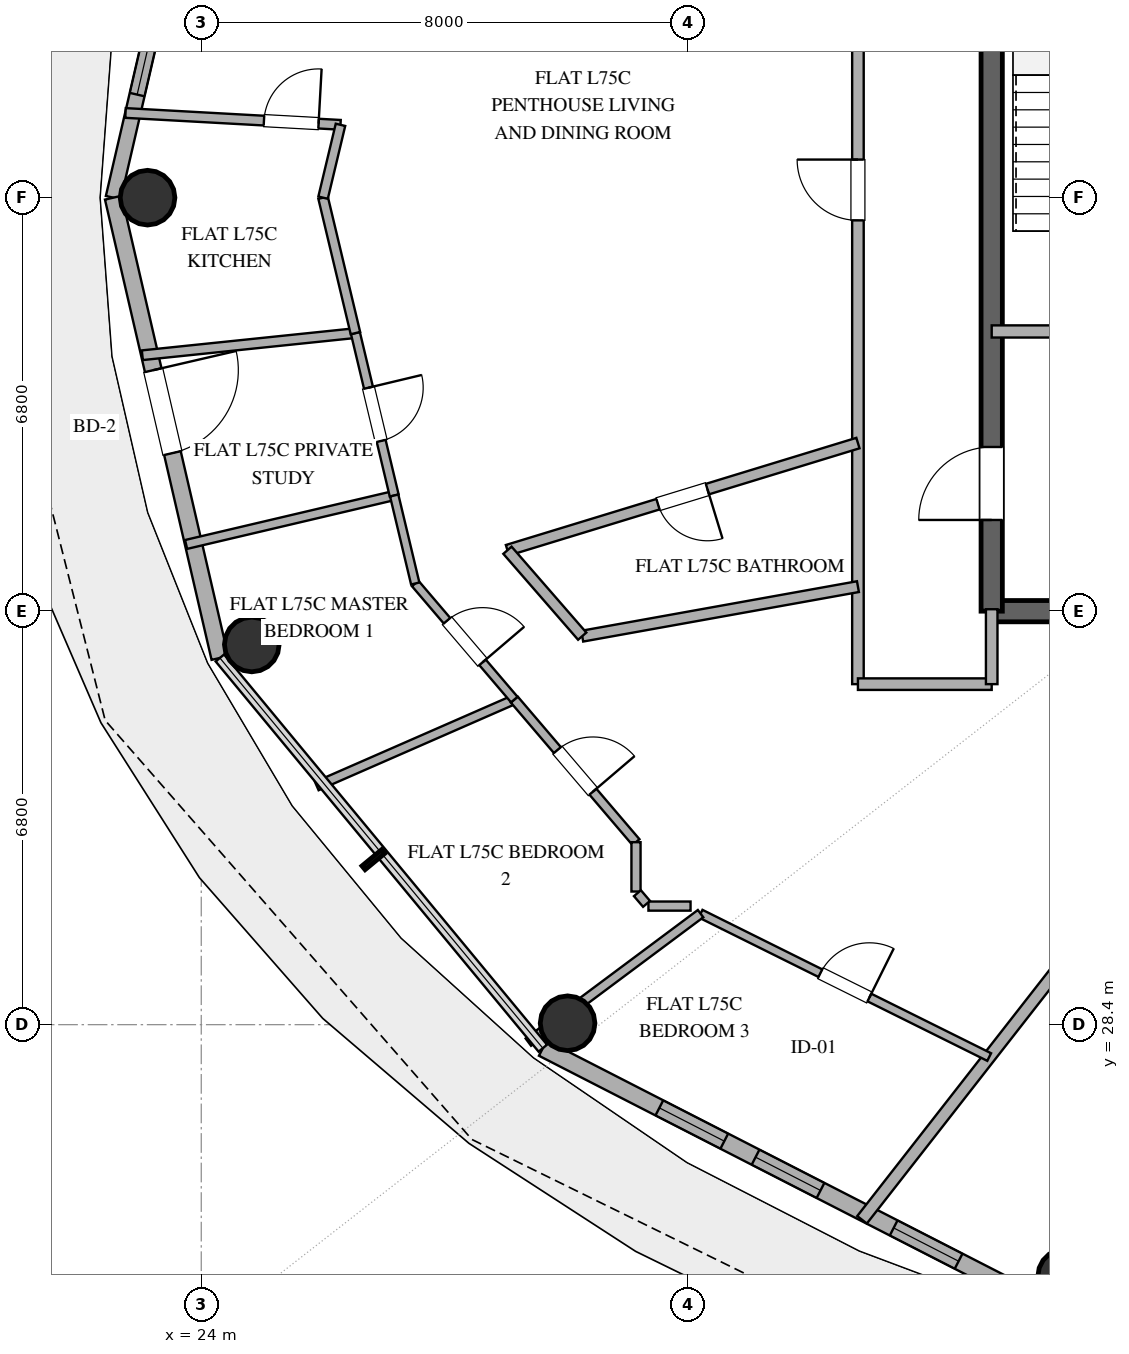
"""IFC4 building model, lengths in metres.
Left out: names, types, materials, properties, quantities, classifications, styles, units other than length and angle.
Written with IfcOpenShell. Run it as: python <this file> out.ifc"""

import sys

from ifc_helpers import new_model, si_unit, direction, frame, frame_2d, origin, origin_2d, place, context, subcontext, project, spatial, rectangle, hollow_circle, extrude, element, fill, save


model = new_model("IFC4")
c1 = context("Model", 3, precision=1e-05, world=origin(), true_north=direction((0.0, 1.0)))
c2 = subcontext(c1, "Body", "Model", "MODEL_VIEW")
j1 = project(units=[si_unit("LENGTHUNIT", "METRE"), si_unit("PLANEANGLEUNIT", "RADIAN")], contexts=[c1])
p1 = place(None, origin())
s1 = spatial("IfcSite", under=j1, at=p1, CompositionType="ELEMENT")
p2 = place(p1, origin())
s2 = spatial("IfcBuilding", under=s1, at=p2, CompositionType="ELEMENT")
p3 = place(p2, frame((0.0, 0.0, 291.0)))
s3 = spatial("IfcBuildingStorey", under=s2, at=p3, CompositionType="ELEMENT", Elevation=291.0)
p4 = place(p3, frame((37.0, 35.2, 0.0), z_axis=(0.0, 0.0, 1.0), x_axis=(1.0, 0.0, 0.0)))
e1 = element("IfcWall", 1, at=p4, inside=s3, PredefinedType="SHEAR", context=c2, shape_type="SweptSolid", body=[
    extrude(rectangle(XDim=4.0, YDim=0.35, at=frame_2d((2.0, 0.0))), origin(), (0.0, 0.0, 1.0), 3.37),
])
p5 = place(p3, frame((37.0, 35.2, 0.0), z_axis=(0.0, 0.0, 1.0), x_axis=(0.0, 1.0, 0.0)))
e2 = element("IfcWall", 2, at=p5, inside=s3, PredefinedType="SHEAR", context=c2, shape_type="SweptSolid", body=[
    extrude(rectangle(XDim=13.6, YDim=0.35, at=frame_2d((6.8, 0.0))), origin(), (0.0, 0.0, 1.0), 3.37),
])
p6 = place(p5, frame((1.5, 0.0, 0.0)))
e3 = element("IfcOpeningElement", 3, at=p6, cuts=e2, PredefinedType="OPENING", context=c2, shape_type="SweptSolid", body=[
    extrude(rectangle(XDim=1.2, YDim=2.15, at=frame_2d((0.6, 1.075))), frame((0.0, 0.185, 0.0), z_axis=(0.0, -1.0, 0.0), x_axis=(1.0, 0.0, 0.0)), (0.0, 0.0, 1.0), 0.37),
])
for number, where, z_axis, x_axis in (
    (4, (23.117, 42.0, 0.0), (0.0, 0.0, 1.0), (1.0, 0.0, 0.0)),
    (5, (24.831, 34.653, 0.0), (0.0, 0.0, 1.0), (1.0, 0.0, 0.0)),
    (6, (30.025, 28.424, 0.0), (0.0, 0.0, 1.0), (1.0, 0.0, 0.0)),
    (7, (38.209, 24.261, 0.0), (0.0, 0.0, 1.0), (1.0, 0.0, 0.0)),
):
    element("IfcColumn", number, at=place(p3, frame(where, z_axis=z_axis, x_axis=x_axis)), inside=s3, PredefinedType="COLUMN", context=c2, shape_type="SweptSolid", body=[
        extrude(hollow_circle(Radius=0.45, WallThickness=0.025, at=origin_2d()), origin(), (0.0, 0.0, 1.0), 3.37),
    ])
p7 = place(p3, frame((24.306, 49.57, 0.0), z_axis=(0.0, 0.0, 1.0), x_axis=(-0.225635078214, -0.974211892495, 0.0)))
e8 = element("IfcWall", 8, at=p7, inside=s3, PredefinedType="SOLIDWALL", context=c2, shape_type="SweptSolid", body=[
    extrude(rectangle(XDim=7.77, YDim=0.25, at=frame_2d((3.885, 0.0))), origin(), (0.0, 0.0, 1.0), 3.37),
])
p8 = place(p7, frame((5.03, 0.0, 1.42)))
e9 = element("IfcOpeningElement", 9, at=p8, cuts=e8, PredefinedType="OPENING", context=c2, shape_type="SweptSolid", body=[
    extrude(rectangle(XDim=1.0, YDim=1.05, at=frame_2d((0.5, 0.525))), frame((0.0, 0.135, 0.0), z_axis=(0.0, -1.0, 0.0), x_axis=(1.0, 0.0, 0.0)), (0.0, 0.0, 1.0), 0.27),
])
p9 = place(p3, frame((22.553, 42.0, 0.0), z_axis=(0.0, 0.0, 1.0), x_axis=(0.225635078214, -0.974211892495, 0.0)))
e10 = element("IfcWall", 10, at=p9, inside=s3, PredefinedType="SOLIDWALL", context=c2, shape_type="SweptSolid", body=[
    extrude(rectangle(XDim=7.77, YDim=0.28, at=frame_2d((3.885, 0.0))), origin(), (0.0, 0.0, 1.0), 3.37),
])
p10 = place(p9, frame((2.912, 0.0, 0.0)))
e11 = element("IfcOpeningElement", 11, at=p10, cuts=e10, PredefinedType="OPENING", context=c2, shape_type="SweptSolid", body=[
    extrude(rectangle(XDim=1.4, YDim=2.2, at=frame_2d((0.7, 1.1))), frame((0.0, 0.15, 0.0), z_axis=(0.0, -1.0, 0.0), x_axis=(1.0, 0.0, 0.0)), (0.0, 0.0, 1.0), 0.3),
])
p11 = place(p3, frame((29.617, 28.013, 0.0), z_axis=(0.0, 0.0, 1.0), x_axis=(0.890007394051, -0.455946091699, 0.0)))
e12 = element("IfcWall", 12, at=p11, inside=s3, PredefinedType="SOLIDWALL", context=c2, shape_type="SweptSolid", body=[
    extrude(rectangle(XDim=9.404, YDim=0.28, at=frame_2d((4.702, 0.0))), origin(), (0.0, 0.0, 1.0), 3.37),
])
p12 = place(p11, frame((2.154, 0.0, 0.85)))
e13 = element("IfcOpeningElement", 13, at=p12, cuts=e12, PredefinedType="OPENING", context=c2, shape_type="SweptSolid", body=[
    extrude(rectangle(XDim=1.2, YDim=1.8, at=frame_2d((0.6, 0.9))), frame((0.0, 0.15, 0.0), z_axis=(0.0, -1.0, 0.0), x_axis=(1.0, 0.0, 0.0)), (0.0, 0.0, 1.0), 0.3),
])
p13 = place(p11, frame((3.931, 0.0, 0.85)))
e14 = element("IfcOpeningElement", 14, at=p13, cuts=e12, PredefinedType="OPENING", context=c2, shape_type="SweptSolid", body=[
    extrude(rectangle(XDim=1.2, YDim=1.8, at=frame_2d((0.6, 0.9))), frame((0.0, 0.15, 0.0), z_axis=(0.0, -1.0, 0.0), x_axis=(1.0, 0.0, 0.0)), (0.0, 0.0, 1.0), 0.3),
])
p14 = place(p11, frame((6.483, 0.0, 0.85)))
e15 = element("IfcOpeningElement", 15, at=p14, cuts=e12, PredefinedType="OPENING", context=c2, shape_type="SweptSolid", body=[
    extrude(rectangle(XDim=1.2, YDim=1.6, at=frame_2d((0.6, 0.8))), frame((0.0, 0.15, 0.0), z_axis=(0.0, -1.0, 0.0), x_axis=(1.0, 0.0, 0.0)), (0.0, 0.0, 1.0), 0.3),
])
p15 = place(p3, frame((37.0, 39.8, 0.0), z_axis=(0.0, 0.0, 1.0), x_axis=(1.0, 0.0, 0.0)))
e16 = element("IfcWall", 16, at=p15, inside=s3, PredefinedType="SOLIDWALL", context=c2, shape_type="SweptSolid", body=[
    extrude(rectangle(XDim=4.0, YDim=0.2, at=frame_2d((2.0, 0.0))), origin(), (0.0, 0.0, 1.0), 2.73),
])
p16 = place(p15, frame((1.45, 0.0, 0.0)))
e17 = element("IfcOpeningElement", 17, at=p16, cuts=e16, PredefinedType="OPENING", context=c2, shape_type="SweptSolid", body=[
    extrude(rectangle(XDim=1.1, YDim=2.15, at=frame_2d((0.55, 1.075))), frame((0.0, 0.11, 0.0), z_axis=(0.0, -1.0, 0.0), x_axis=(1.0, 0.0, 0.0)), (0.0, 0.0, 1.0), 0.22),
])
p17 = place(p3, frame((42.687, 35.2, 0.0), z_axis=(0.0, 0.0, 1.0), x_axis=(-0.615663811723, -0.788008928208, 0.0)))
e18 = element("IfcWall", 18, at=p17, inside=s3, PredefinedType="PARTITIONING", context=c2, shape_type="SweptSolid", body=[
    extrude(rectangle(XDim=12.701, YDim=0.2, at=frame_2d((6.351, 0.0))), origin(), (0.0, 0.0, 1.0), 2.73),
])
p18 = place(p3, frame((34.8, 34.0, 0.0), z_axis=(0.0, 0.0, 1.0), x_axis=(0.0, 1.0, 0.0)))
e19 = element("IfcWall", 19, at=p18, inside=s3, PredefinedType="PARTITIONING", context=c2, shape_type="SweptSolid", body=[
    extrude(rectangle(XDim=16.9, YDim=0.19, at=frame_2d((8.45, 0.0))), origin(), (0.0, 0.0, 1.0), 2.73),
])
p19 = place(p18, frame((7.627, 0.0, 0.0)))
e20 = element("IfcOpeningElement", 20, at=p19, cuts=e19, PredefinedType="OPENING", context=c2, shape_type="SweptSolid", body=[
    extrude(rectangle(XDim=1.0, YDim=2.2, at=frame_2d((0.5, 1.1))), frame((0.0, 0.105, 0.0), z_axis=(0.0, -1.0, 0.0), x_axis=(1.0, 0.0, 0.0)), (0.0, 0.0, 1.0), 0.21),
])
p20 = place(p3, frame((34.8, 37.964, 0.0), z_axis=(0.0, 0.0, 1.0), x_axis=(-0.956308169094, -0.292360540641, 0.0)))
e21 = element("IfcWall", 21, at=p20, inside=s3, PredefinedType="PLUMBINGWALL", context=c2, shape_type="SweptSolid", body=[
    extrude(rectangle(XDim=6.028, YDim=0.18, at=frame_2d((3.014, 0.0))), origin(), (0.0, 0.0, 1.0), 2.73),
])
p21 = place(p20, frame((2.589, 0.0, 0.0)))
e22 = element("IfcOpeningElement", 22, at=p21, cuts=e21, PredefinedType="OPENING", context=c2, shape_type="SweptSolid", body=[
    extrude(rectangle(XDim=0.85, YDim=2.1, at=frame_2d((0.425, 1.05))), frame((0.0, 0.1, 0.0), z_axis=(0.0, -1.0, 0.0), x_axis=(1.0, 0.0, 0.0)), (0.0, 0.0, 1.0), 0.2),
])
p22 = place(p3, frame((32.212, 30.226, 0.0), z_axis=(0.0, 0.0, 1.0), x_axis=(0.895575883974, -0.444908795197, 0.0)))
e23 = element("IfcWall", 23, at=p22, inside=s3, PredefinedType="PARTITIONING", context=c2, shape_type="SweptSolid", body=[
    extrude(rectangle(XDim=5.3, YDim=0.14, at=frame_2d((2.65, 0.0))), origin(), (0.0, 0.0, 1.0), 2.73),
])
p23 = place(p22, frame((2.2, 0.0, 0.0)))
e24 = element("IfcOpeningElement", 24, at=p23, cuts=e23, PredefinedType="OPENING", context=c2, shape_type="SweptSolid", body=[
    extrude(rectangle(XDim=0.9, YDim=2.1, at=frame_2d((0.45, 1.05))), frame((0.0, 0.08, 0.0), z_axis=(0.0, -1.0, 0.0), x_axis=(1.0, 0.0, 0.0)), (0.0, 0.0, 1.0), 0.16),
])
p24 = place(p3, frame((30.265, 34.789, 0.0), z_axis=(0.0, 0.0, 1.0), x_axis=(0.984250881723, 0.176777266148, 0.0)))
e25 = element("IfcWall", 25, at=p24, inside=s3, PredefinedType="PLUMBINGWALL", context=c2, shape_type="SweptSolid", body=[
    extrude(rectangle(XDim=4.607, YDim=0.18, at=frame_2d((2.304, 0.0))), origin(), (0.0, 0.0, 1.0), 2.73),
])
p25 = place(p3, frame((29.148, 33.746, 0.0), z_axis=(0.0, 0.0, 1.0), x_axis=(-0.916054593567, -0.401053589442, 0.0)))
e26 = element("IfcWall", 26, at=p25, inside=s3, PredefinedType="PARTITIONING", context=c2, shape_type="SweptSolid", body=[
    extrude(rectangle(XDim=3.546, YDim=0.15, at=frame_2d((1.773, 0.0))), origin(), (0.0, 0.0, 1.0), 2.73),
])
p26 = place(p3, frame((22.754, 43.393, 0.0), z_axis=(0.0, 0.0, 1.0), x_axis=(0.998481285203, -0.055091951307, 0.0)))
e27 = element("IfcWall", 27, at=p26, inside=s3, PredefinedType="PLUMBINGWALL", context=c2, shape_type="SweptSolid", body=[
    extrude(rectangle(XDim=3.541, YDim=0.16, at=frame_2d((1.771, 0.0))), origin(), (0.0, 0.0, 1.0), 2.73),
])
p27 = place(p26, frame((2.281, 0.0, 0.0)))
e28 = element("IfcOpeningElement", 28, at=p27, cuts=e27, PredefinedType="OPENING", context=c2, shape_type="SweptSolid", body=[
    extrude(rectangle(XDim=0.9, YDim=2.1, at=frame_2d((0.45, 1.05))), frame((0.0, 0.09, 0.0), z_axis=(0.0, -1.0, 0.0), x_axis=(1.0, 0.0, 0.0)), (0.0, 0.0, 1.0), 0.18),
])
p28 = place(p3, frame((32.212, 30.226, 0.0), z_axis=(0.0, 0.0, 1.0), x_axis=(-0.801630280955, -0.597820117306, 0.0)))
e29 = element("IfcWall", 29, at=p28, inside=s3, PredefinedType="PARTITIONING", context=c2, shape_type="SweptSolid", body=[
    extrude(rectangle(XDim=3.534, YDim=0.15, at=frame_2d((1.767, 0.0))), origin(), (0.0, 0.0, 1.0), 2.73),
])
p29 = place(p3, frame((26.536, 39.773, 0.0), z_axis=(0.0, 0.0, 1.0), x_axis=(-0.994663387729, -0.103173374039, 0.0)))
e30 = element("IfcWall", 30, at=p29, inside=s3, PredefinedType="PLUMBINGWALL", context=c2, shape_type="SweptSolid", body=[
    extrude(rectangle(XDim=3.523, YDim=0.16, at=frame_2d((1.762, 0.0))), origin(), (0.0, 0.0, 1.0), 2.73),
])
p30 = place(p3, frame((27.174, 37.102, 0.0), z_axis=(0.0, 0.0, 1.0), x_axis=(-0.973445389286, -0.228919361518, 0.0)))
e31 = element("IfcWall", 31, at=p30, inside=s3, PredefinedType="PARTITIONING", context=c2, shape_type="SweptSolid", body=[
    extrude(rectangle(XDim=3.516, YDim=0.15, at=frame_2d((1.758, 0.0))), origin(), (0.0, 0.0, 1.0), 2.73),
])
p31 = place(p3, frame((29.148, 33.746, 0.0), z_axis=(0.0, 0.0, 1.0), x_axis=(0.649198693287, -0.760618864238, 0.0)))
e32 = element("IfcWall", 32, at=p31, inside=s3, PredefinedType="PARTITIONING", context=c2, shape_type="SweptSolid", body=[
    extrude(rectangle(XDim=3.083, YDim=0.15, at=frame_2d((1.542, 0.0))), origin(), (0.0, 0.0, 1.0), 2.73),
])
p32 = place(p31, frame((1.092, 0.0, 0.0)))
e33 = element("IfcOpeningElement", 33, at=p32, cuts=e32, PredefinedType="OPENING", context=c2, shape_type="SweptSolid", body=[
    extrude(rectangle(XDim=0.9, YDim=2.1, at=frame_2d((0.45, 1.05))), frame((0.0, 0.085, 0.0), z_axis=(0.0, -1.0, 0.0), x_axis=(1.0, 0.0, 0.0)), (0.0, 0.0, 1.0), 0.17),
])
p33 = place(p3, frame((26.536, 39.773, 0.0), z_axis=(0.0, 0.0, 1.0), x_axis=(0.232333689401, -0.97263613791, 0.0)))
e34 = element("IfcWall", 34, at=p33, inside=s3, PredefinedType="PARTITIONING", context=c2, shape_type="SweptSolid", body=[
    extrude(rectangle(XDim=2.746, YDim=0.15, at=frame_2d((1.373, 0.0))), origin(), (0.0, 0.0, 1.0), 2.73),
])
p34 = place(p33, frame((0.923, 0.0, 0.0)))
e35 = element("IfcOpeningElement", 35, at=p34, cuts=e34, PredefinedType="OPENING", context=c2, shape_type="SweptSolid", body=[
    extrude(rectangle(XDim=0.9, YDim=2.1, at=frame_2d((0.45, 1.05))), frame((0.0, 0.085, 0.0), z_axis=(0.0, -1.0, 0.0), x_axis=(1.0, 0.0, 0.0)), (0.0, 0.0, 1.0), 0.17),
])
p35 = place(p3, frame((27.519, 35.655, 0.0), z_axis=(0.0, 0.0, 1.0), x_axis=(0.649219833228, -0.760600820499, 0.0)))
e36 = element("IfcWall", 36, at=p35, inside=s3, PredefinedType="PARTITIONING", context=c2, shape_type="SweptSolid", body=[
    extrude(rectangle(XDim=2.51, YDim=0.14, at=frame_2d((1.255, 0.0))), origin(), (0.0, 0.0, 1.0), 2.73),
])
p36 = place(p35, frame((0.805, 0.0, 0.0)))
e37 = element("IfcOpeningElement", 37, at=p36, cuts=e36, PredefinedType="OPENING", context=c2, shape_type="SweptSolid", body=[
    extrude(rectangle(XDim=0.9, YDim=2.1, at=frame_2d((0.45, 1.05))), frame((0.0, 0.08, 0.0), z_axis=(0.0, -1.0, 0.0), x_axis=(1.0, 0.0, 0.0)), (0.0, 0.0, 1.0), 0.16),
])
p37 = place(p3, frame((26.004, 42.0, 0.0), z_axis=(0.0, 0.0, 1.0), x_axis=(0.232312317028, -0.972641242883, 0.0)))
e38 = element("IfcWall", 38, at=p37, inside=s3, PredefinedType="PLUMBINGWALL", context=c2, shape_type="SweptSolid", body=[
    extrude(rectangle(XDim=2.29, YDim=0.16, at=frame_2d((1.145, 0.0))), origin(), (0.0, 0.0, 1.0), 2.73),
])
p38 = place(p3, frame((37.0, 34.0, 0.0), z_axis=(0.0, 0.0, 1.0), x_axis=(-1.0, 0.0, 0.0)))
e39 = element("IfcWall", 39, at=p38, inside=s3, PredefinedType="PARTITIONING", context=c2, shape_type="SweptSolid", body=[
    extrude(rectangle(XDim=2.2, YDim=0.19, at=frame_2d((1.1, 0.0))), origin(), (0.0, 0.0, 1.0), 2.73),
])
p39 = place(p3, frame((29.036, 36.202, 0.0), z_axis=(0.0, 0.0, 1.0), x_axis=(0.656333580006, -0.754470828963, 0.0)))
e40 = element("IfcWall", 40, at=p39, inside=s3, PredefinedType="PLUMBINGWALL", context=c2, shape_type="SweptSolid", body=[
    extrude(rectangle(XDim=1.873, YDim=0.18, at=frame_2d((0.937, 0.0))), origin(), (0.0, 0.0, 1.0), 2.73),
])
p40 = place(p3, frame((27.174, 37.102, 0.0), z_axis=(0.0, 0.0, 1.0), x_axis=(0.232212116671, -0.972665169969, 0.0)))
e41 = element("IfcWall", 41, at=p40, inside=s3, PredefinedType="PARTITIONING", context=c2, shape_type="SweptSolid", body=[
    extrude(rectangle(XDim=1.488, YDim=0.14, at=frame_2d((0.744, 0.0))), origin(), (0.0, 0.0, 1.0), 2.73),
])
p41 = place(p3, frame((37.0, 35.232, 0.0), z_axis=(0.0, 0.0, 1.0), x_axis=(0.0, -1.0, 0.0)))
e42 = element("IfcWall", 42, at=p41, inside=s3, PredefinedType="PARTITIONING", context=c2, shape_type="SweptSolid", body=[
    extrude(rectangle(XDim=1.232, YDim=0.19, at=frame_2d((0.616, 0.0))), origin(), (0.0, 0.0, 1.0), 2.73),
])
p42 = place(p3, frame((26.29, 43.198, 0.0), z_axis=(0.0, 0.0, 1.0), x_axis=(-0.232308267809, -0.972642210017, 0.0)))
e43 = element("IfcWall", 43, at=p42, inside=s3, PredefinedType="PLUMBINGWALL", context=c2, shape_type="SweptSolid", body=[
    extrude(rectangle(XDim=1.232, YDim=0.16, at=frame_2d((0.616, 0.0))), origin(), (0.0, 0.0, 1.0), 2.73),
])
p43 = place(p3, frame((31.15, 31.401, 0.0), z_axis=(0.0, 0.0, 1.0), x_axis=(0.0, -1.0, 0.0)))
e44 = element("IfcWall", 44, at=p43, inside=s3, PredefinedType="PARTITIONING", context=c2, shape_type="SweptSolid", body=[
    extrude(rectangle(XDim=0.812, YDim=0.15, at=frame_2d((0.406, 0.0))), origin(), (0.0, 0.0, 1.0), 2.73),
])
p44 = place(p3, frame((31.354, 30.35, 0.0), z_axis=(0.0, 0.0, 1.0), x_axis=(1.0, 0.0, 0.0)))
e45 = element("IfcWall", 45, at=p44, inside=s3, PredefinedType="PARTITIONING", context=c2, shape_type="SweptSolid", body=[
    extrude(rectangle(XDim=0.693, YDim=0.15, at=frame_2d((0.346, 0.0))), origin(), (0.0, 0.0, 1.0), 2.73),
])
p45 = place(p3, frame((31.173, 30.562, 0.0), z_axis=(0.0, 0.0, 1.0), x_axis=(0.648874632887, -0.760895334981, 0.0)))
e46 = element("IfcWall", 46, at=p45, inside=s3, PredefinedType="PARTITIONING", context=c2, shape_type="SweptSolid", body=[
    extrude(rectangle(XDim=0.231, YDim=0.15, at=frame_2d((0.115, 0.0))), origin(), (0.0, 0.0, 1.0), 2.73),
])
p46 = place(p10, origin())
e47 = element("IfcDoor", 47, at=p46, inside=s3, OperationType="SINGLE_SWING_LEFT", PredefinedType="DOOR", context=c2, shape_type="SweptSolid", body=[
    extrude(rectangle(XDim=1.4, YDim=2.2, at=frame_2d((0.7, 1.1))), frame((0.0, 0.025, 0.0), z_axis=(0.0, -1.0, 0.0), x_axis=(1.0, 0.0, 0.0)), (0.0, 0.0, 1.0), 0.05),
])
fill(e11, e47)
p47 = place(p12, origin())
e48 = element("IfcWindow", 48, at=p47, inside=s3, PartitioningType="SINGLE_PANEL", PredefinedType="WINDOW", context=c2, shape_type="SweptSolid", body=[
    extrude(rectangle(XDim=1.2, YDim=1.8, at=frame_2d((0.6, 0.9))), frame((0.0, 0.03, 0.0), z_axis=(0.0, -1.0, 0.0), x_axis=(1.0, 0.0, 0.0)), (0.0, 0.0, 1.0), 0.06),
])
fill(e13, e48)
p48 = place(p13, origin())
e49 = element("IfcWindow", 49, at=p48, inside=s3, PartitioningType="SINGLE_PANEL", PredefinedType="WINDOW", context=c2, shape_type="SweptSolid", body=[
    extrude(rectangle(XDim=1.2, YDim=1.8, at=frame_2d((0.6, 0.9))), frame((0.0, 0.03, 0.0), z_axis=(0.0, -1.0, 0.0), x_axis=(1.0, 0.0, 0.0)), (0.0, 0.0, 1.0), 0.06),
])
fill(e14, e49)
p49 = place(p14, origin())
e50 = element("IfcWindow", 50, at=p49, inside=s3, PartitioningType="SINGLE_PANEL", PredefinedType="WINDOW", context=c2, shape_type="SweptSolid", body=[
    extrude(rectangle(XDim=1.2, YDim=1.6, at=frame_2d((0.6, 0.8))), frame((0.0, 0.03, 0.0), z_axis=(0.0, -1.0, 0.0), x_axis=(1.0, 0.0, 0.0)), (0.0, 0.0, 1.0), 0.06),
])
fill(e15, e50)
p50 = place(p8, origin())
e51 = element("IfcWindow", 51, at=p50, inside=s3, PartitioningType="SINGLE_PANEL", PredefinedType="WINDOW", context=c2, shape_type="SweptSolid", body=[
    extrude(rectangle(XDim=1.0, YDim=1.05, at=frame_2d((0.5, 0.525))), frame((0.0, 0.03, 0.0), z_axis=(0.0, -1.0, 0.0), x_axis=(1.0, 0.0, 0.0)), (0.0, 0.0, 1.0), 0.06),
])
fill(e9, e51)
p51 = place(p6, origin())
e52 = element("IfcDoor", 52, at=p51, inside=s3, OperationType="SINGLE_SWING_LEFT", PredefinedType="DOOR", context=c2, shape_type="SweptSolid", body=[
    extrude(rectangle(XDim=1.2, YDim=2.15, at=frame_2d((0.6, 1.075))), frame((0.0, 0.025, 0.0), z_axis=(0.0, -1.0, 0.0), x_axis=(1.0, 0.0, 0.0)), (0.0, 0.0, 1.0), 0.05),
])
fill(e3, e52)
p52 = place(p19, origin())
e53 = element("IfcDoor", 53, at=p52, inside=s3, OperationType="SINGLE_SWING_RIGHT", PredefinedType="DOOR", context=c2, shape_type="SweptSolid", body=[
    extrude(rectangle(XDim=1.0, YDim=2.2, at=frame_2d((0.5, 1.1))), frame((0.0, 0.025, 0.0), z_axis=(0.0, -1.0, 0.0), x_axis=(1.0, 0.0, 0.0)), (0.0, 0.0, 1.0), 0.05),
])
fill(e20, e53)
p53 = place(p21, origin())
e54 = element("IfcDoor", 54, at=p53, inside=s3, OperationType="SINGLE_SWING_LEFT", PredefinedType="DOOR", context=c2, shape_type="SweptSolid", body=[
    extrude(rectangle(XDim=0.85, YDim=2.1, at=frame_2d((0.425, 1.05))), frame((0.0, 0.025, 0.0), z_axis=(0.0, -1.0, 0.0), x_axis=(1.0, 0.0, 0.0)), (0.0, 0.0, 1.0), 0.05),
])
fill(e22, e54)
p54 = place(p23, origin())
e55 = element("IfcDoor", 55, at=p54, inside=s3, OperationType="SINGLE_SWING_RIGHT", PredefinedType="DOOR", context=c2, shape_type="SweptSolid", body=[
    extrude(rectangle(XDim=0.9, YDim=2.1, at=frame_2d((0.45, 1.05))), frame((0.0, 0.025, 0.0), z_axis=(0.0, -1.0, 0.0), x_axis=(1.0, 0.0, 0.0)), (0.0, 0.0, 1.0), 0.05),
])
fill(e24, e55)
p55 = place(p27, origin())
e56 = element("IfcDoor", 56, at=p55, inside=s3, OperationType="SINGLE_SWING_RIGHT", PredefinedType="DOOR", context=c2, shape_type="SweptSolid", body=[
    extrude(rectangle(XDim=0.9, YDim=2.1, at=frame_2d((0.45, 1.05))), frame((0.0, 0.025, 0.0), z_axis=(0.0, -1.0, 0.0), x_axis=(1.0, 0.0, 0.0)), (0.0, 0.0, 1.0), 0.05),
])
fill(e28, e56)
p56 = place(p32, origin())
e57 = element("IfcDoor", 57, at=p56, inside=s3, OperationType="SINGLE_SWING_RIGHT", PredefinedType="DOOR", context=c2, shape_type="SweptSolid", body=[
    extrude(rectangle(XDim=0.9, YDim=2.1, at=frame_2d((0.45, 1.05))), frame((0.0, 0.025, 0.0), z_axis=(0.0, -1.0, 0.0), x_axis=(1.0, 0.0, 0.0)), (0.0, 0.0, 1.0), 0.05),
])
fill(e33, e57)
p57 = place(p34, origin())
e58 = element("IfcDoor", 58, at=p57, inside=s3, OperationType="SINGLE_SWING_LEFT", PredefinedType="DOOR", context=c2, shape_type="SweptSolid", body=[
    extrude(rectangle(XDim=0.9, YDim=2.1, at=frame_2d((0.45, 1.05))), frame((0.0, 0.025, 0.0), z_axis=(0.0, -1.0, 0.0), x_axis=(1.0, 0.0, 0.0)), (0.0, 0.0, 1.0), 0.05),
])
fill(e35, e58)
p58 = place(p36, origin())
e59 = element("IfcDoor", 59, at=p58, inside=s3, OperationType="SINGLE_SWING_RIGHT", PredefinedType="DOOR", context=c2, shape_type="SweptSolid", body=[
    extrude(rectangle(XDim=0.9, YDim=2.1, at=frame_2d((0.45, 1.05))), frame((0.0, 0.025, 0.0), z_axis=(0.0, -1.0, 0.0), x_axis=(1.0, 0.0, 0.0)), (0.0, 0.0, 1.0), 0.05),
])
fill(e37, e59)
save(model, sys.argv[1])
